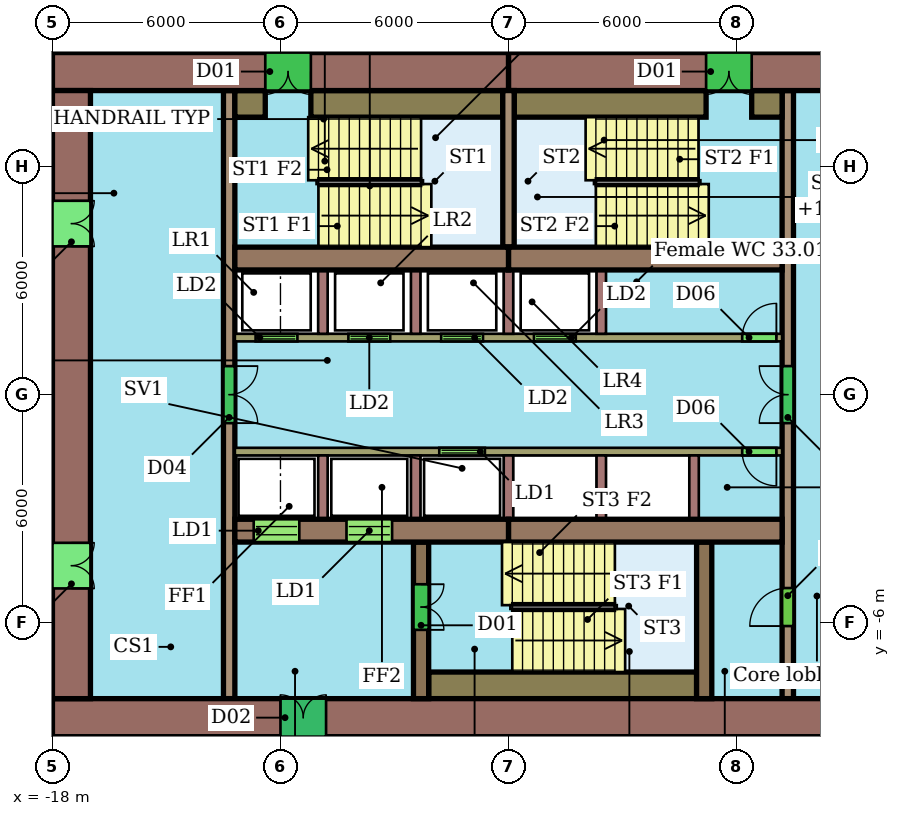
"""IFC4 building model, lengths in metres.
Left out: names, types, materials, properties, quantities, classifications, styles, units other than length and angle.
Written with IfcOpenShell. Run it as: python <this file> out.ifc"""

import sys

from ifc_helpers import new_model, si_unit, direction, frame, frame_2d, origin, place, context, subcontext, project, spatial, rectangle, extrude, element, fill, save


model = new_model("IFC4")
c1 = context("Model", 3, precision=1e-05, world=origin(), true_north=direction((0.0, 1.0)))
c2 = subcontext(c1, "Body", "Model", "MODEL_VIEW")
j1 = project(units=[si_unit("LENGTHUNIT", "METRE"), si_unit("PLANEANGLEUNIT", "RADIAN")], contexts=[c1])
p1 = place(None, origin())
s1 = spatial("IfcSite", under=j1, at=p1, CompositionType="ELEMENT")
p2 = place(p1, origin())
s2 = spatial("IfcBuilding", under=s1, at=p2, CompositionType="ELEMENT")
p3 = place(p2, frame((0.0, 0.0, 143.4)))
s3 = spatial("IfcBuildingStorey", under=s2, at=p3, CompositionType="ELEMENT", Elevation=143.4)
p4 = place(p3, frame((6.0, 8.5, 0.0), z_axis=(0.0, 0.0, 1.0), x_axis=(-1.0, 0.0, 0.0)))
e1 = element("IfcWall", 1, at=p4, inside=s3, PredefinedType="SHEAR", context=c2, shape_type="SweptSolid", body=[
    extrude(rectangle(XDim=12.0, YDim=1.0, at=frame_2d((6.0, 0.0))), origin(), (0.0, 0.0, 1.0), 3.3),
])
p5 = place(p4, frame((5.6, 0.0, 0.0)))
e2 = element("IfcOpeningElement", 2, at=p5, cuts=e1, PredefinedType="OPENING", context=c2, shape_type="SweptSolid", body=[
    extrude(rectangle(XDim=1.2, YDim=2.1, at=frame_2d((0.6, 1.05))), frame((0.0, 0.51, 0.0), z_axis=(0.0, -1.0, 0.0), x_axis=(1.0, 0.0, 0.0)), (0.0, 0.0, 1.0), 1.02),
])
p6 = place(p3, frame((-6.0, 8.5, 0.0), z_axis=(0.0, 0.0, 1.0), x_axis=(-1.0, 0.0, 0.0)))
e3 = element("IfcWall", 3, at=p6, inside=s3, PredefinedType="SHEAR", context=c2, shape_type="SweptSolid", body=[
    extrude(rectangle(XDim=12.0, YDim=1.0, at=frame_2d((6.0, 0.0))), origin(), (0.0, 0.0, 1.0), 3.3),
])
p7 = place(p6, frame((5.2, 0.0, 0.0)))
e4 = element("IfcOpeningElement", 4, at=p7, cuts=e3, PredefinedType="OPENING", context=c2, shape_type="SweptSolid", body=[
    extrude(rectangle(XDim=1.2, YDim=2.1, at=frame_2d((0.6, 1.05))), frame((0.0, 0.51, 0.0), z_axis=(0.0, -1.0, 0.0), x_axis=(1.0, 0.0, 0.0)), (0.0, 0.0, 1.0), 1.02),
])
p8 = place(p3, frame((-18.0, -8.5, 0.0), z_axis=(0.0, 0.0, 1.0), x_axis=(1.0, 0.0, 0.0)))
e5 = element("IfcWall", 5, at=p8, inside=s3, PredefinedType="SHEAR", context=c2, shape_type="SweptSolid", body=[
    extrude(rectangle(XDim=24.0, YDim=1.0, at=frame_2d((12.0, 0.0))), origin(), (0.0, 0.0, 1.0), 3.3),
])
p9 = place(p8, frame((6.0, 0.0, 0.0)))
e6 = element("IfcOpeningElement", 6, at=p9, cuts=e5, PredefinedType="OPENING", context=c2, shape_type="SweptSolid", body=[
    extrude(rectangle(XDim=1.2, YDim=2.1, at=frame_2d((0.6, 1.05))), frame((0.0, 0.51, 0.0), z_axis=(0.0, -1.0, 0.0), x_axis=(1.0, 0.0, 0.0)), (0.0, 0.0, 1.0), 1.02),
])
p10 = place(p3, frame((-17.5, 8.0, 0.0), z_axis=(0.0, 0.0, 1.0), x_axis=(0.0, -1.0, 0.0)))
e7 = element("IfcWall", 7, at=p10, inside=s3, PredefinedType="SHEAR", context=c2, shape_type="SweptSolid", body=[
    extrude(rectangle(XDim=16.0, YDim=1.0, at=frame_2d((8.0, 0.0))), origin(), (0.0, 0.0, 1.0), 3.3),
])
p11 = place(p10, frame((11.9, 0.0, 0.0)))
e8 = element("IfcOpeningElement", 8, at=p11, cuts=e7, PredefinedType="OPENING", context=c2, shape_type="SweptSolid", body=[
    extrude(rectangle(XDim=1.2, YDim=2.1, at=frame_2d((0.6, 1.05))), frame((0.0, 0.51, 0.0), z_axis=(0.0, -1.0, 0.0), x_axis=(1.0, 0.0, 0.0)), (0.0, 0.0, 1.0), 1.02),
])
p12 = place(p10, frame((2.9, 0.0, 0.0)))
e9 = element("IfcOpeningElement", 9, at=p12, cuts=e7, PredefinedType="OPENING", context=c2, shape_type="SweptSolid", body=[
    extrude(rectangle(XDim=1.2, YDim=2.1, at=frame_2d((0.6, 1.05))), frame((0.0, 0.51, 0.0), z_axis=(0.0, -1.0, 0.0), x_axis=(1.0, 0.0, 0.0)), (0.0, 0.0, 1.0), 1.02),
])
for number, where, z_axis, x_axis in (
    (10, (-13.2, 3.58, 0.0), (0.0, 0.0, 1.0), (1.0, 0.0, 0.0)),
    (11, (-6.0, 3.58, 0.0), (0.0, 0.0, 1.0), (1.0, 0.0, 0.0)),
):
    element("IfcWall", number, at=place(p3, frame(where, z_axis=z_axis, x_axis=x_axis)), inside=s3, PredefinedType="SHEAR", context=c2, shape_type="SweptSolid", body=[
        extrude(rectangle(XDim=7.2, YDim=0.6, at=frame_2d((3.6, 0.0))), origin(), (0.0, 0.0, 1.0), 3.3),
    ])
p13 = place(p3, frame((-13.2, -3.58, 0.0), z_axis=(0.0, 0.0, 1.0), x_axis=(1.0, 0.0, 0.0)))
e12 = element("IfcWall", 12, at=p13, inside=s3, PredefinedType="SHEAR", context=c2, shape_type="SweptSolid", body=[
    extrude(rectangle(XDim=7.2, YDim=0.6, at=frame_2d((3.6, 0.0))), origin(), (0.0, 0.0, 1.0), 3.3),
])
p14 = place(p13, frame((0.496, 0.0, 0.0)))
e13 = element("IfcOpeningElement", 13, at=p14, cuts=e12, PredefinedType="OPENING", context=c2, shape_type="SweptSolid", body=[
    extrude(rectangle(XDim=1.2, YDim=2.1, at=frame_2d((0.6, 1.05))), frame((0.0, 0.31, 0.0), z_axis=(0.0, -1.0, 0.0), x_axis=(1.0, 0.0, 0.0)), (0.0, 0.0, 1.0), 0.62),
])
p15 = place(p13, frame((2.938, 0.0, 0.0)))
e14 = element("IfcOpeningElement", 14, at=p15, cuts=e12, PredefinedType="OPENING", context=c2, shape_type="SweptSolid", body=[
    extrude(rectangle(XDim=1.2, YDim=2.1, at=frame_2d((0.6, 1.05))), frame((0.0, 0.31, 0.0), z_axis=(0.0, -1.0, 0.0), x_axis=(1.0, 0.0, 0.0)), (0.0, 0.0, 1.0), 0.62),
])
p16 = place(p3, frame((-6.0, -3.58, 0.0), z_axis=(0.0, 0.0, 1.0), x_axis=(1.0, 0.0, 0.0)))
e15 = element("IfcWall", 15, at=p16, inside=s3, PredefinedType="SHEAR", context=c2, shape_type="SweptSolid", body=[
    extrude(rectangle(XDim=7.2, YDim=0.6, at=frame_2d((3.6, 0.0))), origin(), (0.0, 0.0, 1.0), 3.3),
])
p17 = place(p3, frame((-13.35, 8.0, 0.0), z_axis=(0.0, 0.0, 1.0), x_axis=(0.0, -1.0, 0.0)))
e16 = element("IfcWall", 16, at=p17, inside=s3, PredefinedType="SHEAR", context=c2, shape_type="SweptSolid", body=[
    extrude(rectangle(XDim=16.0, YDim=0.3, at=frame_2d((8.0, 0.0))), origin(), (0.0, 0.0, 1.0), 3.3),
])
p18 = place(p17, frame((7.25, 0.0, 0.0)))
e17 = element("IfcOpeningElement", 17, at=p18, cuts=e16, PredefinedType="OPENING", context=c2, shape_type="SweptSolid", body=[
    extrude(rectangle(XDim=1.5, YDim=2.1, at=frame_2d((0.75, 1.05))), frame((0.0, 0.16, 0.0), z_axis=(0.0, -1.0, 0.0), x_axis=(1.0, 0.0, 0.0)), (0.0, 0.0, 1.0), 0.32),
])
p19 = place(p3, frame((1.35, -8.0, 0.0), z_axis=(0.0, 0.0, 1.0), x_axis=(0.0, 1.0, 0.0)))
e18 = element("IfcWall", 18, at=p19, inside=s3, PredefinedType="SHEAR", context=c2, shape_type="SweptSolid", body=[
    extrude(rectangle(XDim=16.0, YDim=0.3, at=frame_2d((8.0, 0.0))), origin(), (0.0, 0.0, 1.0), 3.3),
])
p20 = place(p19, frame((1.91, 0.0, 0.0)))
e19 = element("IfcOpeningElement", 19, at=p20, cuts=e18, PredefinedType="OPENING", context=c2, shape_type="SweptSolid", body=[
    extrude(rectangle(XDim=1.0, YDim=2.1, at=frame_2d((0.5, 1.05))), frame((0.0, 0.16, 0.0), z_axis=(0.0, -1.0, 0.0), x_axis=(1.0, 0.0, 0.0)), (0.0, 0.0, 1.0), 0.32),
])
p21 = place(p19, frame((7.25, 0.0, 0.0)))
e20 = element("IfcOpeningElement", 20, at=p21, cuts=e18, PredefinedType="OPENING", context=c2, shape_type="SweptSolid", body=[
    extrude(rectangle(XDim=1.5, YDim=2.1, at=frame_2d((0.75, 1.05))), frame((0.0, 0.16, 0.0), z_axis=(0.0, -1.0, 0.0), x_axis=(1.0, 0.0, 0.0)), (0.0, 0.0, 1.0), 0.32),
])
p22 = place(p3, frame((-13.2, 1.5, 0.0), z_axis=(0.0, 0.0, 1.0), x_axis=(1.0, 0.0, 0.0)))
e21 = element("IfcWall", 21, at=p22, inside=s3, PredefinedType="SHEAR", context=c2, shape_type="SweptSolid", body=[
    extrude(rectangle(XDim=14.4, YDim=0.2, at=frame_2d((7.2, 0.0))), origin(), (0.0, 0.0, 1.0), 3.3),
])
p23 = place(p22, frame((0.546, 0.0, 0.0)))
e22 = element("IfcOpeningElement", 22, at=p23, cuts=e21, PredefinedType="OPENING", context=c2, shape_type="SweptSolid", body=[
    extrude(rectangle(XDim=1.1, YDim=2.1, at=frame_2d((0.55, 1.05))), frame((0.0, 0.11, 0.0), z_axis=(0.0, -1.0, 0.0), x_axis=(1.0, 0.0, 0.0)), (0.0, 0.0, 1.0), 0.22),
])
p24 = place(p22, frame((2.988, 0.0, 0.0)))
e23 = element("IfcOpeningElement", 23, at=p24, cuts=e21, PredefinedType="OPENING", context=c2, shape_type="SweptSolid", body=[
    extrude(rectangle(XDim=1.1, YDim=2.1, at=frame_2d((0.55, 1.05))), frame((0.0, 0.11, 0.0), z_axis=(0.0, -1.0, 0.0), x_axis=(1.0, 0.0, 0.0)), (0.0, 0.0, 1.0), 0.22),
])
p25 = place(p22, frame((5.429, 0.0, 0.0)))
e24 = element("IfcOpeningElement", 24, at=p25, cuts=e21, PredefinedType="OPENING", context=c2, shape_type="SweptSolid", body=[
    extrude(rectangle(XDim=1.1, YDim=2.1, at=frame_2d((0.55, 1.05))), frame((0.0, 0.11, 0.0), z_axis=(0.0, -1.0, 0.0), x_axis=(1.0, 0.0, 0.0)), (0.0, 0.0, 1.0), 0.22),
])
p26 = place(p22, frame((7.871, 0.0, 0.0)))
e25 = element("IfcOpeningElement", 25, at=p26, cuts=e21, PredefinedType="OPENING", context=c2, shape_type="SweptSolid", body=[
    extrude(rectangle(XDim=1.1, YDim=2.1, at=frame_2d((0.55, 1.05))), frame((0.0, 0.11, 0.0), z_axis=(0.0, -1.0, 0.0), x_axis=(1.0, 0.0, 0.0)), (0.0, 0.0, 1.0), 0.22),
])
p27 = place(p22, frame((13.35, 0.0, 0.0)))
e26 = element("IfcOpeningElement", 26, at=p27, cuts=e21, PredefinedType="OPENING", context=c2, shape_type="SweptSolid", body=[
    extrude(rectangle(XDim=0.9, YDim=2.1, at=frame_2d((0.45, 1.05))), frame((0.0, 0.11, 0.0), z_axis=(0.0, -1.0, 0.0), x_axis=(1.0, 0.0, 0.0)), (0.0, 0.0, 1.0), 0.22),
])
p28 = place(p3, frame((1.2, -1.5, 0.0), z_axis=(0.0, 0.0, 1.0), x_axis=(-1.0, 0.0, 0.0)))
e27 = element("IfcWall", 27, at=p28, inside=s3, PredefinedType="SHEAR", context=c2, shape_type="SweptSolid", body=[
    extrude(rectangle(XDim=14.4, YDim=0.2, at=frame_2d((7.2, 0.0))), origin(), (0.0, 0.0, 1.0), 3.3),
])
p29 = place(p28, frame((7.821, 0.0, 0.0)))
e28 = element("IfcOpeningElement", 28, at=p29, cuts=e27, PredefinedType="OPENING", context=c2, shape_type="SweptSolid", body=[
    extrude(rectangle(XDim=1.2, YDim=2.1, at=frame_2d((0.6, 1.05))), frame((0.0, 0.11, 0.0), z_axis=(0.0, -1.0, 0.0), x_axis=(1.0, 0.0, 0.0)), (0.0, 0.0, 1.0), 0.22),
])
p30 = place(p28, frame((0.15, 0.0, 0.0)))
e29 = element("IfcOpeningElement", 29, at=p30, cuts=e27, PredefinedType="OPENING", context=c2, shape_type="SweptSolid", body=[
    extrude(rectangle(XDim=0.9, YDim=2.1, at=frame_2d((0.45, 1.05))), frame((0.0, 0.11, 0.0), z_axis=(0.0, -1.0, 0.0), x_axis=(1.0, 0.0, 0.0)), (0.0, 0.0, 1.0), 0.22),
])
p31 = place(p3, frame((-8.3, -3.88, 0.0), z_axis=(0.0, 0.0, 1.0), x_axis=(0.0, -1.0, 0.0)))
e30 = element("IfcWall", 30, at=p31, inside=s3, PredefinedType="SHEAR", context=c2, shape_type="SweptSolid", body=[
    extrude(rectangle(XDim=4.12, YDim=0.4, at=frame_2d((2.06, 0.0))), origin(), (0.0, 0.0, 1.0), 3.3),
])
p32 = place(p31, frame((1.11, 0.0, 0.0)))
e31 = element("IfcOpeningElement", 31, at=p32, cuts=e30, PredefinedType="OPENING", context=c2, shape_type="SweptSolid", body=[
    extrude(rectangle(XDim=1.2, YDim=2.1, at=frame_2d((0.6, 1.05))), frame((0.0, 0.21, 0.0), z_axis=(0.0, -1.0, 0.0), x_axis=(1.0, 0.0, 0.0)), (0.0, 0.0, 1.0), 0.42),
])
p33 = place(p3, frame((-0.85, -3.88, 0.0), z_axis=(0.0, 0.0, 1.0), x_axis=(0.0, -1.0, 0.0)))
e32 = element("IfcWall", 32, at=p33, inside=s3, PredefinedType="SHEAR", context=c2, shape_type="SweptSolid", body=[
    extrude(rectangle(XDim=4.12, YDim=0.4, at=frame_2d((2.06, 0.0))), origin(), (0.0, 0.0, 1.0), 3.3),
])
p34 = place(p3, frame((-6.0, 3.88, 0.0), z_axis=(0.0, 0.0, 1.0), x_axis=(0.0, 1.0, 0.0)))
e33 = element("IfcWall", 33, at=p34, inside=s3, PredefinedType="SHEAR", context=c2, shape_type="SweptSolid", body=[
    extrude(rectangle(XDim=4.12, YDim=0.3, at=frame_2d((2.06, 0.0))), origin(), (0.0, 0.0, 1.0), 3.3),
])
p35 = place(p3, frame((-13.2, 7.65, 0.0), z_axis=(0.0, 0.0, 1.0), x_axis=(1.0, 0.0, 0.0)))
e34 = element("IfcWall", 34, at=p35, inside=s3, PredefinedType="SHEAR", context=c2, shape_type="SweptSolid", body=[
    extrude(rectangle(XDim=0.8, YDim=0.7, at=frame_2d((0.4, 0.0))), origin(), (0.0, 0.0, 1.0), 3.3),
])
for number, where, z_axis, x_axis in (
    (35, (-11.2, 7.65, 0.0), (0.0, 0.0, 1.0), (1.0, 0.0, 0.0)),
    (36, (-5.85, 7.65, 0.0), (0.0, 0.0, 1.0), (1.0, 0.0, 0.0)),
):
    element("IfcWall", number, at=place(p3, frame(where, z_axis=z_axis, x_axis=x_axis)), inside=s3, PredefinedType="SHEAR", context=c2, shape_type="SweptSolid", body=[
        extrude(rectangle(XDim=5.05, YDim=0.7, at=frame_2d((2.525, 0.0))), origin(), (0.0, 0.0, 1.0), 3.3),
    ])
p36 = place(p3, frame((0.4, 7.65, 0.0), z_axis=(0.0, 0.0, 1.0), x_axis=(1.0, 0.0, 0.0)))
e37 = element("IfcWall", 37, at=p36, inside=s3, PredefinedType="SHEAR", context=c2, shape_type="SweptSolid", body=[
    extrude(rectangle(XDim=0.8, YDim=0.7, at=frame_2d((0.4, 0.0))), origin(), (0.0, 0.0, 1.0), 3.3),
])
p37 = place(p3, frame((-8.1, -7.65, 0.0), z_axis=(0.0, 0.0, 1.0), x_axis=(1.0, 0.0, 0.0)))
e38 = element("IfcWall", 38, at=p37, inside=s3, PredefinedType="SHEAR", context=c2, shape_type="SweptSolid", body=[
    extrude(rectangle(XDim=7.05, YDim=0.7, at=frame_2d((3.525, 0.0))), origin(), (0.0, 0.0, 1.0), 3.3),
])
for number, where, z_axis, x_axis in (
    (39, (-10.883, 1.6, 0.0), (0.0, 0.0, 1.0), (0.0, 1.0, 0.0)),
    (40, (-8.442, 1.6, 0.0), (0.0, 0.0, 1.0), (0.0, 1.0, 0.0)),
    (41, (-6.0, 1.6, 0.0), (0.0, 0.0, 1.0), (0.0, 1.0, 0.0)),
    (42, (-3.558, 1.6, 0.0), (0.0, 0.0, 1.0), (0.0, 1.0, 0.0)),
    (43, (-10.883, -1.6, 0.0), (0.0, 0.0, 1.0), (0.0, -1.0, 0.0)),
    (44, (-8.442, -1.6, 0.0), (0.0, 0.0, 1.0), (0.0, -1.0, 0.0)),
    (45, (-6.0, -1.6, 0.0), (0.0, 0.0, 1.0), (0.0, -1.0, 0.0)),
    (46, (-3.558, -1.6, 0.0), (0.0, 0.0, 1.0), (0.0, -1.0, 0.0)),
    (47, (-1.117, -1.6, 0.0), (0.0, 0.0, 1.0), (0.0, -1.0, 0.0)),
):
    element("IfcWall", number, at=place(p3, frame(where, z_axis=z_axis, x_axis=x_axis)), inside=s3, PredefinedType="SHEAR", context=c2, shape_type="SweptSolid", body=[
        extrude(rectangle(XDim=1.68, YDim=0.25, at=frame_2d((0.84, 0.0))), origin(), (0.0, 0.0, 1.0), 3.3),
    ])
p38 = place(p5, origin())
e48 = element("IfcDoor", 48, at=p38, inside=s3, OperationType="DOUBLE_DOOR_SINGLE_SWING", PredefinedType="NOTDEFINED", context=c2, shape_type="SweptSolid", body=[
    extrude(rectangle(XDim=1.2, YDim=2.1, at=frame_2d((0.6, 1.05))), frame((0.0, 0.025, 0.0), z_axis=(0.0, -1.0, 0.0), x_axis=(1.0, 0.0, 0.0)), (0.0, 0.0, 1.0), 0.05),
])
fill(e2, e48)
p39 = place(p7, origin())
e49 = element("IfcDoor", 49, at=p39, inside=s3, OperationType="DOUBLE_DOOR_SINGLE_SWING", PredefinedType="NOTDEFINED", context=c2, shape_type="SweptSolid", body=[
    extrude(rectangle(XDim=1.2, YDim=2.1, at=frame_2d((0.6, 1.05))), frame((0.0, 0.025, 0.0), z_axis=(0.0, -1.0, 0.0), x_axis=(1.0, 0.0, 0.0)), (0.0, 0.0, 1.0), 0.05),
])
fill(e4, e49)
p40 = place(p9, origin())
e50 = element("IfcDoor", 50, at=p40, inside=s3, OperationType="DOUBLE_DOOR_SINGLE_SWING", PredefinedType="NOTDEFINED", context=c2, shape_type="SweptSolid", body=[
    extrude(rectangle(XDim=1.2, YDim=2.1, at=frame_2d((0.6, 1.05))), frame((0.0, 0.025, 0.0), z_axis=(0.0, -1.0, 0.0), x_axis=(1.0, 0.0, 0.0)), (0.0, 0.0, 1.0), 0.05),
])
fill(e6, e50)
p41 = place(p11, origin())
e51 = element("IfcDoor", 51, at=p41, inside=s3, OperationType="DOUBLE_DOOR_SINGLE_SWING", PredefinedType="NOTDEFINED", context=c2, shape_type="SweptSolid", body=[
    extrude(rectangle(XDim=1.2, YDim=2.1, at=frame_2d((0.6, 1.05))), frame((0.0, 0.025, 0.0), z_axis=(0.0, -1.0, 0.0), x_axis=(1.0, 0.0, 0.0)), (0.0, 0.0, 1.0), 0.05),
])
fill(e8, e51)
p42 = place(p12, origin())
e52 = element("IfcDoor", 52, at=p42, inside=s3, OperationType="DOUBLE_DOOR_SINGLE_SWING", PredefinedType="NOTDEFINED", context=c2, shape_type="SweptSolid", body=[
    extrude(rectangle(XDim=1.2, YDim=2.1, at=frame_2d((0.6, 1.05))), frame((0.0, 0.025, 0.0), z_axis=(0.0, -1.0, 0.0), x_axis=(1.0, 0.0, 0.0)), (0.0, 0.0, 1.0), 0.05),
])
fill(e9, e52)
p43 = place(p14, origin())
e53 = element("IfcDoor", 53, at=p43, inside=s3, OperationType="DOUBLE_DOOR_SLIDING", PredefinedType="NOTDEFINED", context=c2, shape_type="SweptSolid", body=[
    extrude(rectangle(XDim=1.2, YDim=2.1, at=frame_2d((0.6, 1.05))), frame((0.0, 0.025, 0.0), z_axis=(0.0, -1.0, 0.0), x_axis=(1.0, 0.0, 0.0)), (0.0, 0.0, 1.0), 0.05),
])
fill(e13, e53)
p44 = place(p15, origin())
e54 = element("IfcDoor", 54, at=p44, inside=s3, OperationType="DOUBLE_DOOR_SLIDING", PredefinedType="NOTDEFINED", context=c2, shape_type="SweptSolid", body=[
    extrude(rectangle(XDim=1.2, YDim=2.1, at=frame_2d((0.6, 1.05))), frame((0.0, 0.025, 0.0), z_axis=(0.0, -1.0, 0.0), x_axis=(1.0, 0.0, 0.0)), (0.0, 0.0, 1.0), 0.05),
])
fill(e14, e54)
p45 = place(p18, origin())
e55 = element("IfcDoor", 55, at=p45, inside=s3, OperationType="DOUBLE_DOOR_SINGLE_SWING", PredefinedType="NOTDEFINED", context=c2, shape_type="SweptSolid", body=[
    extrude(rectangle(XDim=1.5, YDim=2.1, at=frame_2d((0.75, 1.05))), frame((0.0, 0.025, 0.0), z_axis=(0.0, -1.0, 0.0), x_axis=(1.0, 0.0, 0.0)), (0.0, 0.0, 1.0), 0.05),
])
fill(e17, e55)
p46 = place(p20, origin())
e56 = element("IfcDoor", 56, at=p46, inside=s3, OperationType="SINGLE_SWING_LEFT", PredefinedType="NOTDEFINED", context=c2, shape_type="SweptSolid", body=[
    extrude(rectangle(XDim=1.0, YDim=2.1, at=frame_2d((0.5, 1.05))), frame((0.0, 0.025, 0.0), z_axis=(0.0, -1.0, 0.0), x_axis=(1.0, 0.0, 0.0)), (0.0, 0.0, 1.0), 0.05),
])
fill(e19, e56)
p47 = place(p21, origin())
e57 = element("IfcDoor", 57, at=p47, inside=s3, OperationType="DOUBLE_DOOR_SINGLE_SWING", PredefinedType="NOTDEFINED", context=c2, shape_type="SweptSolid", body=[
    extrude(rectangle(XDim=1.5, YDim=2.1, at=frame_2d((0.75, 1.05))), frame((0.0, 0.025, 0.0), z_axis=(0.0, -1.0, 0.0), x_axis=(1.0, 0.0, 0.0)), (0.0, 0.0, 1.0), 0.05),
])
fill(e20, e57)
p48 = place(p23, origin())
e58 = element("IfcDoor", 58, at=p48, inside=s3, OperationType="DOUBLE_DOOR_SLIDING", PredefinedType="NOTDEFINED", context=c2, shape_type="SweptSolid", body=[
    extrude(rectangle(XDim=1.1, YDim=2.1, at=frame_2d((0.55, 1.05))), frame((0.0, 0.025, 0.0), z_axis=(0.0, -1.0, 0.0), x_axis=(1.0, 0.0, 0.0)), (0.0, 0.0, 1.0), 0.05),
])
fill(e22, e58)
p49 = place(p24, origin())
e59 = element("IfcDoor", 59, at=p49, inside=s3, OperationType="DOUBLE_DOOR_SLIDING", PredefinedType="NOTDEFINED", context=c2, shape_type="SweptSolid", body=[
    extrude(rectangle(XDim=1.1, YDim=2.1, at=frame_2d((0.55, 1.05))), frame((0.0, 0.025, 0.0), z_axis=(0.0, -1.0, 0.0), x_axis=(1.0, 0.0, 0.0)), (0.0, 0.0, 1.0), 0.05),
])
fill(e23, e59)
p50 = place(p25, origin())
e60 = element("IfcDoor", 60, at=p50, inside=s3, OperationType="DOUBLE_DOOR_SLIDING", PredefinedType="NOTDEFINED", context=c2, shape_type="SweptSolid", body=[
    extrude(rectangle(XDim=1.1, YDim=2.1, at=frame_2d((0.55, 1.05))), frame((0.0, 0.025, 0.0), z_axis=(0.0, -1.0, 0.0), x_axis=(1.0, 0.0, 0.0)), (0.0, 0.0, 1.0), 0.05),
])
fill(e24, e60)
p51 = place(p26, origin())
e61 = element("IfcDoor", 61, at=p51, inside=s3, OperationType="DOUBLE_DOOR_SLIDING", PredefinedType="NOTDEFINED", context=c2, shape_type="SweptSolid", body=[
    extrude(rectangle(XDim=1.1, YDim=2.1, at=frame_2d((0.55, 1.05))), frame((0.0, 0.025, 0.0), z_axis=(0.0, -1.0, 0.0), x_axis=(1.0, 0.0, 0.0)), (0.0, 0.0, 1.0), 0.05),
])
fill(e25, e61)
p52 = place(p27, origin())
e62 = element("IfcDoor", 62, at=p52, inside=s3, OperationType="SINGLE_SWING_RIGHT", PredefinedType="NOTDEFINED", context=c2, shape_type="SweptSolid", body=[
    extrude(rectangle(XDim=0.9, YDim=2.1, at=frame_2d((0.45, 1.05))), frame((0.0, 0.025, 0.0), z_axis=(0.0, -1.0, 0.0), x_axis=(1.0, 0.0, 0.0)), (0.0, 0.0, 1.0), 0.05),
])
fill(e26, e62)
p53 = place(p29, origin())
e63 = element("IfcDoor", 63, at=p53, inside=s3, OperationType="DOUBLE_DOOR_SLIDING", PredefinedType="NOTDEFINED", context=c2, shape_type="SweptSolid", body=[
    extrude(rectangle(XDim=1.2, YDim=2.1, at=frame_2d((0.6, 1.05))), frame((0.0, 0.025, 0.0), z_axis=(0.0, -1.0, 0.0), x_axis=(1.0, 0.0, 0.0)), (0.0, 0.0, 1.0), 0.05),
])
fill(e28, e63)
p54 = place(p30, origin())
e64 = element("IfcDoor", 64, at=p54, inside=s3, OperationType="SINGLE_SWING_LEFT", PredefinedType="NOTDEFINED", context=c2, shape_type="SweptSolid", body=[
    extrude(rectangle(XDim=0.9, YDim=2.1, at=frame_2d((0.45, 1.05))), frame((0.0, 0.025, 0.0), z_axis=(0.0, -1.0, 0.0), x_axis=(1.0, 0.0, 0.0)), (0.0, 0.0, 1.0), 0.05),
])
fill(e29, e64)
p55 = place(p32, origin())
e65 = element("IfcDoor", 65, at=p55, inside=s3, OperationType="DOUBLE_DOOR_SINGLE_SWING", PredefinedType="NOTDEFINED", context=c2, shape_type="SweptSolid", body=[
    extrude(rectangle(XDim=1.2, YDim=2.1, at=frame_2d((0.6, 1.05))), frame((0.0, 0.025, 0.0), z_axis=(0.0, -1.0, 0.0), x_axis=(1.0, 0.0, 0.0)), (0.0, 0.0, 1.0), 0.05),
])
fill(e31, e65)
save(model, sys.argv[1])
